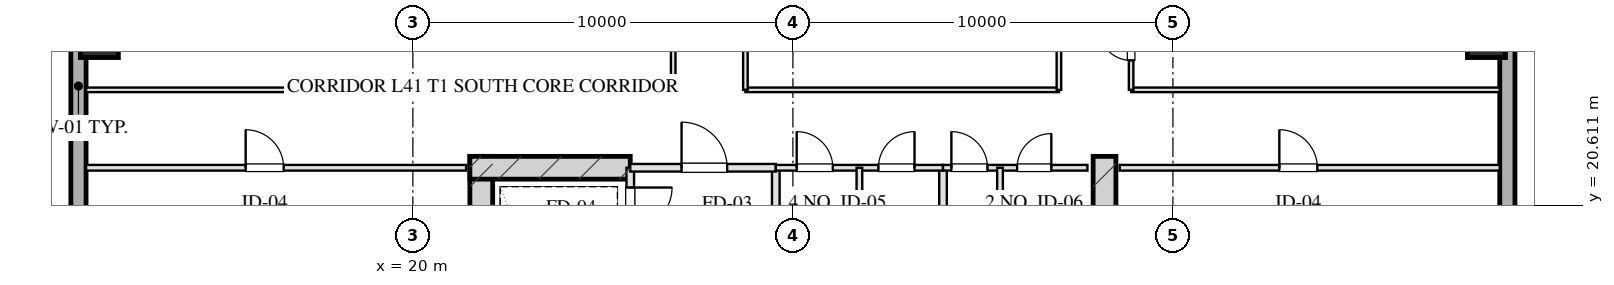
"""IFC4 building model, lengths in metres.
Left out: names, types, materials, properties, quantities, classifications, styles, units other than length and angle.
Written with IfcOpenShell. Run it as: python <this file> out.ifc"""

import sys

from ifc_helpers import new_model, si_unit, direction, frame, frame_2d, origin, origin_2d, place, context, subcontext, project, spatial, rectangle, hollow_rectangle, extrude, element, fill, save


model = new_model("IFC4")
c1 = context("Model", 3, precision=1e-05, world=origin(), true_north=direction((0.0, 1.0)))
c2 = subcontext(c1, "Body", "Model", "MODEL_VIEW")
j1 = project(units=[si_unit("LENGTHUNIT", "METRE"), si_unit("PLANEANGLEUNIT", "RADIAN")], contexts=[c1])
p1 = place(None, origin())
s1 = spatial("IfcSite", under=j1, at=p1, CompositionType="ELEMENT")
p2 = place(p1, origin())
s2 = spatial("IfcBuilding", under=s1, at=p2, CompositionType="ELEMENT")
p3 = place(p2, frame((0.0, 0.0, 156.4)))
s3 = spatial("IfcBuildingStorey", under=s2, at=p3, CompositionType="ELEMENT", Elevation=156.4)
for number, where, z_axis, x_axis in (
    (1, (21.8, 21.9, 0.0), (0.0, 0.0, 1.0), (0.0, -1.0, 0.0)),
    (2, (38.2, 21.9, 0.0), (0.0, 0.0, 1.0), (0.0, -1.0, 0.0)),
):
    element("IfcWall", number, at=place(p3, frame(where, z_axis=z_axis, x_axis=x_axis)), inside=s3, PredefinedType="SHEAR", context=c2, shape_type="SweptSolid", body=[
        extrude(rectangle(XDim=9.48, YDim=0.6, at=frame_2d((4.74, 0.0))), origin(), (0.0, 0.0, 1.0), 3.45),
    ])
p4 = place(p3, frame((21.5, 21.6, 0.0), z_axis=(0.0, 0.0, 1.0), x_axis=(1.0, 0.0, 0.0)))
e3 = element("IfcWall", 3, at=p4, inside=s3, PredefinedType="SHEAR", context=c2, shape_type="SweptSolid", body=[
    extrude(rectangle(XDim=4.22, YDim=0.6, at=frame_2d((2.11, 0.0))), origin(), (0.0, 0.0, 1.0), 3.45),
])
for number, where, z_axis, x_axis in (
    (4, (11.75, 25.0, 0.0), (0.0, 0.0, 1.0), (1.0, 0.0, 0.0)),
    (5, (48.25, 25.0, 0.0), (0.0, 0.0, 1.0), (1.0, 0.0, 0.0)),
):
    element("IfcColumn", number, at=place(p3, frame(where, z_axis=z_axis, x_axis=x_axis)), inside=s3, PredefinedType="COLUMN", context=c2, shape_type="SweptSolid", body=[
        extrude(hollow_rectangle(XDim=1.0, YDim=1.0, WallThickness=0.036, at=origin_2d()), origin(), (0.0, 0.0, 1.0), 3.451),
    ])
p5 = place(p3, frame((11.2, 9.0, 0.0), z_axis=(0.0, 0.0, 1.0), x_axis=(0.0, 1.0, 0.0)))
e6 = element("IfcWall", 6, at=p5, inside=s3, PredefinedType="SOLIDWALL", context=c2, shape_type="SweptSolid", body=[
    extrude(rectangle(XDim=50.0, YDim=0.4, at=frame_2d((25.0, 0.0))), origin(), (0.0, 0.0, 1.0), 2.61),
])
p6 = place(p5, frame((17.475, 0.0, 0.75)))
e7 = element("IfcOpeningElement", 7, at=p6, cuts=e6, PredefinedType="OPENING", context=c2, shape_type="SweptSolid", body=[
    extrude(rectangle(XDim=2.25, YDim=1.46, at=frame_2d((1.125, 0.73))), frame((0.0, 0.21, 0.0), z_axis=(0.0, -1.0, 0.0), x_axis=(1.0, 0.0, 0.0)), (0.0, 0.0, 1.0), 0.42),
])
p7 = place(p5, frame((30.25, 0.0, 0.0)))
e8 = element("IfcOpeningElement", 8, at=p7, cuts=e6, PredefinedType="OPENING", context=c2, shape_type="SweptSolid", body=[
    extrude(rectangle(XDim=1.1, YDim=2.15, at=frame_2d((0.55, 1.075))), frame((0.0, 0.21, 0.0), z_axis=(0.0, -1.0, 0.0), x_axis=(1.0, 0.0, 0.0)), (0.0, 0.0, 1.0), 0.42),
])
p8 = place(p3, frame((48.8, 59.0, 0.0), z_axis=(0.0, 0.0, 1.0), x_axis=(0.0, -1.0, 0.0)))
e9 = element("IfcWall", 9, at=p8, inside=s3, PredefinedType="SOLIDWALL", context=c2, shape_type="SweptSolid", body=[
    extrude(rectangle(XDim=50.0, YDim=0.4, at=frame_2d((25.0, 0.0))), origin(), (0.0, 0.0, 1.0), 2.61),
])
p9 = place(p8, frame((21.35, 0.0, 0.0)))
e10 = element("IfcOpeningElement", 10, at=p9, cuts=e9, PredefinedType="OPENING", context=c2, shape_type="SweptSolid", body=[
    extrude(rectangle(XDim=1.1, YDim=2.15, at=frame_2d((0.55, 1.075))), frame((0.0, 0.21, 0.0), z_axis=(0.0, -1.0, 0.0), x_axis=(1.0, 0.0, 0.0)), (0.0, 0.0, 1.0), 0.42),
])
p10 = place(p3, frame((25.72, 21.6, 0.0), z_axis=(0.0, 0.0, 1.0), x_axis=(0.0, -1.0, 0.0)))
e11 = element("IfcWall", 11, at=p10, inside=s3, PredefinedType="PARTITIONING", context=c2, shape_type="SweptSolid", body=[
    extrude(rectangle(XDim=1.9, YDim=0.2, at=frame_2d((0.95, 0.0))), origin(), (0.0, 0.0, 1.0), 3.175),
])
p11 = place(p10, frame((0.52, 0.0, 0.0)))
e12 = element("IfcOpeningElement", 12, at=p11, cuts=e11, PredefinedType="OPENING", context=c2, shape_type="SweptSolid", body=[
    extrude(rectangle(XDim=1.1, YDim=2.05, at=frame_2d((0.55, 1.025))), frame((0.0, 0.11, 0.0), z_axis=(0.0, -1.0, 0.0), x_axis=(1.0, 0.0, 0.0)), (0.0, 0.0, 1.0), 0.22),
])
p12 = place(p3, frame((29.55, 21.6, 0.0), z_axis=(0.0, 0.0, 1.0), x_axis=(0.0, -1.0, 0.0)))
e13 = element("IfcWall", 13, at=p12, inside=s3, PredefinedType="PARTITIONING", context=c2, shape_type="SweptSolid", body=[
    extrude(rectangle(XDim=8.43, YDim=0.2, at=frame_2d((4.215, 0.0))), origin(), (0.0, 0.0, 1.0), 3.175),
])
p13 = place(p3, frame((25.72, 21.6, 0.0), z_axis=(0.0, 0.0, 1.0), x_axis=(1.0, 0.0, 0.0)))
e14 = element("IfcWall", 14, at=p13, inside=s3, PredefinedType="PARTITIONING", context=c2, shape_type="SweptSolid", body=[
    extrude(rectangle(XDim=3.83, YDim=0.2, at=frame_2d((1.915, 0.0))), origin(), (0.0, 0.0, 1.0), 3.175),
])
p14 = place(p13, frame((1.35, 0.0, 0.0)))
e15 = element("IfcOpeningElement", 15, at=p14, cuts=e14, PredefinedType="OPENING", context=c2, shape_type="SweptSolid", body=[
    extrude(rectangle(XDim=1.2, YDim=2.05, at=frame_2d((0.6, 1.025))), frame((0.0, 0.11, 0.0), z_axis=(0.0, -1.0, 0.0), x_axis=(1.0, 0.0, 0.0)), (0.0, 0.0, 1.0), 0.22),
])
p15 = place(p3, frame((33.95, 21.6, 0.0), z_axis=(0.0, 0.0, 1.0), x_axis=(0.0, -1.0, 0.0)))
e16 = element("IfcWall", 16, at=p15, inside=s3, PredefinedType="PARTITIONING", context=c2, shape_type="SweptSolid", body=[
    extrude(rectangle(XDim=8.43, YDim=0.2, at=frame_2d((4.215, 0.0))), origin(), (0.0, 0.0, 1.0), 3.175),
])
p16 = place(p3, frame((29.55, 21.6, 0.0), z_axis=(0.0, 0.0, 1.0), x_axis=(1.0, 0.0, 0.0)))
e17 = element("IfcWall", 17, at=p16, inside=s3, PredefinedType="PARTITIONING", context=c2, shape_type="SweptSolid", body=[
    extrude(rectangle(XDim=4.4, YDim=0.15, at=frame_2d((2.2, 0.0))), origin(), (0.0, 0.0, 1.0), 3.175),
])
p17 = place(p16, frame((0.55, 0.0, 0.0)))
e18 = element("IfcOpeningElement", 18, at=p17, cuts=e17, PredefinedType="OPENING", context=c2, shape_type="SweptSolid", body=[
    extrude(rectangle(XDim=0.95, YDim=2.05, at=frame_2d((0.475, 1.025))), frame((0.0, 0.085, 0.0), z_axis=(0.0, -1.0, 0.0), x_axis=(1.0, 0.0, 0.0)), (0.0, 0.0, 1.0), 0.17),
])
p18 = place(p16, frame((2.7, 0.0, 0.0)))
e19 = element("IfcOpeningElement", 19, at=p18, cuts=e17, PredefinedType="OPENING", context=c2, shape_type="SweptSolid", body=[
    extrude(rectangle(XDim=0.95, YDim=2.05, at=frame_2d((0.475, 1.025))), frame((0.0, 0.085, 0.0), z_axis=(0.0, -1.0, 0.0), x_axis=(1.0, 0.0, 0.0)), (0.0, 0.0, 1.0), 0.17),
])
p19 = place(p3, frame((31.75, 21.6, 0.0), z_axis=(0.0, 0.0, 1.0), x_axis=(0.0, -1.0, 0.0)))
e20 = element("IfcWall", 20, at=p19, inside=s3, PredefinedType="PARTITIONING", context=c2, shape_type="SweptSolid", body=[
    extrude(rectangle(XDim=8.43, YDim=0.15, at=frame_2d((4.215, 0.0))), origin(), (0.0, 0.0, 1.0), 3.175),
])
p20 = place(p3, frame((33.95, 21.6, 0.0), z_axis=(0.0, 0.0, 1.0), x_axis=(1.0, 0.0, 0.0)))
e21 = element("IfcWall", 21, at=p20, inside=s3, PredefinedType="PARTITIONING", context=c2, shape_type="SweptSolid", body=[
    extrude(rectangle(XDim=3.8, YDim=0.15, at=frame_2d((1.9, 0.0))), origin(), (0.0, 0.0, 1.0), 3.175),
])
p21 = place(p20, frame((0.22, 0.0, 0.0)))
e22 = element("IfcOpeningElement", 22, at=p21, cuts=e21, PredefinedType="OPENING", context=c2, shape_type="SweptSolid", body=[
    extrude(rectangle(XDim=0.95, YDim=2.05, at=frame_2d((0.475, 1.025))), frame((0.0, 0.085, 0.0), z_axis=(0.0, -1.0, 0.0), x_axis=(1.0, 0.0, 0.0)), (0.0, 0.0, 1.0), 0.17),
])
p22 = place(p20, frame((1.95, 0.0, 0.0)))
e23 = element("IfcOpeningElement", 23, at=p22, cuts=e21, PredefinedType="OPENING", context=c2, shape_type="SweptSolid", body=[
    extrude(rectangle(XDim=0.9, YDim=2.05, at=frame_2d((0.45, 1.025))), frame((0.0, 0.085, 0.0), z_axis=(0.0, -1.0, 0.0), x_axis=(1.0, 0.0, 0.0)), (0.0, 0.0, 1.0), 0.17),
])
p23 = place(p3, frame((35.45, 21.6, 0.0), z_axis=(0.0, 0.0, 1.0), x_axis=(0.0, -1.0, 0.0)))
e24 = element("IfcWall", 24, at=p23, inside=s3, PredefinedType="PARTITIONING", context=c2, shape_type="SweptSolid", body=[
    extrude(rectangle(XDim=8.43, YDim=0.15, at=frame_2d((4.215, 0.0))), origin(), (0.0, 0.0, 1.0), 2.815),
])
p24 = place(p23, frame((2.55, 0.0, 0.0)))
e25 = element("IfcOpeningElement", 25, at=p24, cuts=e24, PredefinedType="OPENING", context=c2, shape_type="SweptSolid", body=[
    extrude(rectangle(XDim=0.95, YDim=2.05, at=frame_2d((0.475, 1.025))), frame((0.0, 0.085, 0.0), z_axis=(0.0, -1.0, 0.0), x_axis=(1.0, 0.0, 0.0)), (0.0, 0.0, 1.0), 0.17),
])
p25 = place(p23, frame((5.6, 0.0, 0.0)))
e26 = element("IfcOpeningElement", 26, at=p25, cuts=e24, PredefinedType="OPENING", context=c2, shape_type="SweptSolid", body=[
    extrude(rectangle(XDim=0.9, YDim=2.05, at=frame_2d((0.45, 1.025))), frame((0.0, 0.085, 0.0), z_axis=(0.0, -1.0, 0.0), x_axis=(1.0, 0.0, 0.0)), (0.0, 0.0, 1.0), 0.17),
])
p26 = place(p3, frame((11.4, 21.6, 0.0), z_axis=(0.0, 0.0, 1.0), x_axis=(1.0, 0.0, 0.0)))
e27 = element("IfcWall", 27, at=p26, inside=s3, PredefinedType="PARTITIONING", context=c2, shape_type="SweptSolid", body=[
    extrude(rectangle(XDim=10.0, YDim=0.15, at=frame_2d((5.0, 0.0))), origin(), (0.0, 0.0, 1.0), 2.15),
])
p27 = place(p26, frame((4.2, 0.0, 0.0)))
e28 = element("IfcOpeningElement", 28, at=p27, cuts=e27, PredefinedType="OPENING", context=c2, shape_type="SweptSolid", body=[
    extrude(rectangle(XDim=1.0, YDim=2.05, at=frame_2d((0.5, 1.025))), frame((0.0, 0.085, 0.0), z_axis=(0.0, -1.0, 0.0), x_axis=(1.0, 0.0, 0.0)), (0.0, 0.0, 1.0), 0.17),
])
p28 = place(p3, frame((38.6, 21.6, 0.0), z_axis=(0.0, 0.0, 1.0), x_axis=(1.0, 0.0, 0.0)))
e29 = element("IfcWall", 29, at=p28, inside=s3, PredefinedType="PARTITIONING", context=c2, shape_type="SweptSolid", body=[
    extrude(rectangle(XDim=10.0, YDim=0.15, at=frame_2d((5.0, 0.0))), origin(), (0.0, 0.0, 1.0), 2.15),
])
p29 = place(p28, frame((4.2, 0.0, 0.0)))
e30 = element("IfcOpeningElement", 30, at=p29, cuts=e29, PredefinedType="OPENING", context=c2, shape_type="SweptSolid", body=[
    extrude(rectangle(XDim=1.0, YDim=2.05, at=frame_2d((0.5, 1.025))), frame((0.0, 0.085, 0.0), z_axis=(0.0, -1.0, 0.0), x_axis=(1.0, 0.0, 0.0)), (0.0, 0.0, 1.0), 0.17),
])
p30 = place(p3, frame((11.4, 23.65, 0.0), z_axis=(0.0, 0.0, 1.0), x_axis=(1.0, 0.0, 0.0)))
e31 = element("IfcWall", 31, at=p30, inside=s3, PredefinedType="PARTITIONING", context=c2, shape_type="SweptSolid", body=[
    extrude(rectangle(XDim=15.45, YDim=0.12, at=frame_2d((7.725, 0.0))), origin(), (0.0, 0.0, 1.0), 2.15),
])
p31 = place(p3, frame((28.75, 23.65, 0.0), z_axis=(0.0, 0.0, 1.0), x_axis=(1.0, 0.0, 0.0)))
e32 = element("IfcWall", 32, at=p31, inside=s3, PredefinedType="PARTITIONING", context=c2, shape_type="SweptSolid", body=[
    extrude(rectangle(XDim=8.25, YDim=0.12, at=frame_2d((4.125, 0.0))), origin(), (0.0, 0.0, 1.0), 3.175),
])
p32 = place(p3, frame((38.9, 23.65, 0.0), z_axis=(0.0, 0.0, 1.0), x_axis=(1.0, 0.0, 0.0)))
e33 = element("IfcWall", 33, at=p32, inside=s3, PredefinedType="PARTITIONING", context=c2, shape_type="SweptSolid", body=[
    extrude(rectangle(XDim=9.7, YDim=0.12, at=frame_2d((4.85, 0.0))), origin(), (0.0, 0.0, 1.0), 2.15),
])
p33 = place(p3, frame((26.85, 23.65, 0.0), z_axis=(0.0, 0.0, 1.0), x_axis=(0.0, 1.0, 0.0)))
e34 = element("IfcWall", 34, at=p33, inside=s3, PredefinedType="PARTITIONING", context=c2, shape_type="SweptSolid", body=[
    extrude(rectangle(XDim=20.7, YDim=0.12, at=frame_2d((10.35, 0.0))), origin(), (0.0, 0.0, 1.0), 3.175),
])
p34 = place(p33, frame((2.675, 0.0, 0.0)))
e35 = element("IfcOpeningElement", 35, at=p34, cuts=e34, PredefinedType="OPENING", context=c2, shape_type="SweptSolid", body=[
    extrude(rectangle(XDim=1.0, YDim=2.05, at=frame_2d((0.5, 1.025))), frame((0.0, 0.07, 0.0), z_axis=(0.0, -1.0, 0.0), x_axis=(1.0, 0.0, 0.0)), (0.0, 0.0, 1.0), 0.14),
])
p35 = place(p33, frame((9.85, 0.0, 0.0)))
e36 = element("IfcOpeningElement", 36, at=p35, cuts=e34, PredefinedType="OPENING", context=c2, shape_type="SweptSolid", body=[
    extrude(rectangle(XDim=1.05, YDim=2.05, at=frame_2d((0.525, 1.025))), frame((0.0, 0.07, 0.0), z_axis=(0.0, -1.0, 0.0), x_axis=(1.0, 0.0, 0.0)), (0.0, 0.0, 1.0), 0.14),
])
p36 = place(p33, frame((17.025, 0.0, 0.0)))
e37 = element("IfcOpeningElement", 37, at=p36, cuts=e34, PredefinedType="OPENING", context=c2, shape_type="SweptSolid", body=[
    extrude(rectangle(XDim=1.0, YDim=2.05, at=frame_2d((0.5, 1.025))), frame((0.0, 0.07, 0.0), z_axis=(0.0, -1.0, 0.0), x_axis=(1.0, 0.0, 0.0)), (0.0, 0.0, 1.0), 0.14),
])
p37 = place(p3, frame((28.75, 23.65, 0.0), z_axis=(0.0, 0.0, 1.0), x_axis=(0.0, 1.0, 0.0)))
e38 = element("IfcWall", 38, at=p37, inside=s3, PredefinedType="PARTITIONING", context=c2, shape_type="SweptSolid", body=[
    extrude(rectangle(XDim=20.7, YDim=0.12, at=frame_2d((10.35, 0.0))), origin(), (0.0, 0.0, 1.0), 3.175),
])
p38 = place(p37, frame((9.936, 0.0, 0.0)))
e39 = element("IfcOpeningElement", 39, at=p38, cuts=e38, PredefinedType="OPENING", context=c2, shape_type="SweptSolid", body=[
    extrude(rectangle(XDim=1.1, YDim=2.05, at=frame_2d((0.55, 1.025))), frame((0.0, 0.07, 0.0), z_axis=(0.0, -1.0, 0.0), x_axis=(1.0, 0.0, 0.0)), (0.0, 0.0, 1.0), 0.14),
])
p39 = place(p3, frame((37.0, 23.65, 0.0), z_axis=(0.0, 0.0, 1.0), x_axis=(0.0, 1.0, 0.0)))
e40 = element("IfcWall", 40, at=p39, inside=s3, PredefinedType="PARTITIONING", context=c2, shape_type="SweptSolid", body=[
    extrude(rectangle(XDim=20.7, YDim=0.12, at=frame_2d((10.35, 0.0))), origin(), (0.0, 0.0, 1.0), 3.175),
])
p40 = place(p3, frame((38.9, 23.65, 0.0), z_axis=(0.0, 0.0, 1.0), x_axis=(0.0, 1.0, 0.0)))
e41 = element("IfcWall", 41, at=p40, inside=s3, PredefinedType="PARTITIONING", context=c2, shape_type="SweptSolid", body=[
    extrude(rectangle(XDim=20.7, YDim=0.12, at=frame_2d((10.35, 0.0))), origin(), (0.0, 0.0, 1.0), 3.175),
])
p41 = place(p40, frame((0.775, 0.0, 0.0)))
e42 = element("IfcOpeningElement", 42, at=p41, cuts=e41, PredefinedType="OPENING", context=c2, shape_type="SweptSolid", body=[
    extrude(rectangle(XDim=0.85, YDim=2.05, at=frame_2d((0.425, 1.025))), frame((0.0, 0.07, 0.0), z_axis=(0.0, -1.0, 0.0), x_axis=(1.0, 0.0, 0.0)), (0.0, 0.0, 1.0), 0.14),
])
p42 = place(p40, frame((3.95, 0.0, 0.0)))
e43 = element("IfcOpeningElement", 43, at=p42, cuts=e41, PredefinedType="OPENING", context=c2, shape_type="SweptSolid", body=[
    extrude(rectangle(XDim=1.0, YDim=2.05, at=frame_2d((0.5, 1.025))), frame((0.0, 0.07, 0.0), z_axis=(0.0, -1.0, 0.0), x_axis=(1.0, 0.0, 0.0)), (0.0, 0.0, 1.0), 0.14),
])
p43 = place(p40, frame((8.45, 0.0, 0.0)))
e44 = element("IfcOpeningElement", 44, at=p43, cuts=e41, PredefinedType="OPENING", context=c2, shape_type="SweptSolid", body=[
    extrude(rectangle(XDim=1.0, YDim=2.05, at=frame_2d((0.5, 1.025))), frame((0.0, 0.07, 0.0), z_axis=(0.0, -1.0, 0.0), x_axis=(1.0, 0.0, 0.0)), (0.0, 0.0, 1.0), 0.14),
])
p44 = place(p40, frame((12.95, 0.0, 0.0)))
e45 = element("IfcOpeningElement", 45, at=p44, cuts=e41, PredefinedType="OPENING", context=c2, shape_type="SweptSolid", body=[
    extrude(rectangle(XDim=1.0, YDim=2.05, at=frame_2d((0.5, 1.025))), frame((0.0, 0.07, 0.0), z_axis=(0.0, -1.0, 0.0), x_axis=(1.0, 0.0, 0.0)), (0.0, 0.0, 1.0), 0.14),
])
p45 = place(p40, frame((16.299, 0.0, 0.0)))
e46 = element("IfcOpeningElement", 46, at=p45, cuts=e41, PredefinedType="OPENING", context=c2, shape_type="SweptSolid", body=[
    extrude(rectangle(XDim=1.05, YDim=2.05, at=frame_2d((0.525, 1.025))), frame((0.0, 0.07, 0.0), z_axis=(0.0, -1.0, 0.0), x_axis=(1.0, 0.0, 0.0)), (0.0, 0.0, 1.0), 0.14),
])
p46 = place(p40, frame((18.974, 0.0, 0.0)))
e47 = element("IfcOpeningElement", 47, at=p46, cuts=e41, PredefinedType="OPENING", context=c2, shape_type="SweptSolid", body=[
    extrude(rectangle(XDim=1.0, YDim=2.05, at=frame_2d((0.5, 1.025))), frame((0.0, 0.07, 0.0), z_axis=(0.0, -1.0, 0.0), x_axis=(1.0, 0.0, 0.0)), (0.0, 0.0, 1.0), 0.14),
])
p47 = place(p11, origin())
e48 = element("IfcDoor", 48, at=p47, inside=s3, OperationType="SINGLE_SWING_LEFT", PredefinedType="DOOR", context=c2, shape_type="SweptSolid", body=[
    extrude(rectangle(XDim=1.1, YDim=2.05, at=frame_2d((0.55, 1.025))), frame((0.0, 0.025, 0.0), z_axis=(0.0, -1.0, 0.0), x_axis=(1.0, 0.0, 0.0)), (0.0, 0.0, 1.0), 0.05),
])
fill(e12, e48)
p48 = place(p14, origin())
e49 = element("IfcDoor", 49, at=p48, inside=s3, OperationType="SINGLE_SWING_LEFT", PredefinedType="DOOR", context=c2, shape_type="SweptSolid", body=[
    extrude(rectangle(XDim=1.2, YDim=2.05, at=frame_2d((0.6, 1.025))), frame((0.0, 0.025, 0.0), z_axis=(0.0, -1.0, 0.0), x_axis=(1.0, 0.0, 0.0)), (0.0, 0.0, 1.0), 0.05),
])
fill(e15, e49)
p49 = place(p17, origin())
e50 = element("IfcDoor", 50, at=p49, inside=s3, OperationType="SINGLE_SWING_LEFT", PredefinedType="DOOR", context=c2, shape_type="SweptSolid", body=[
    extrude(rectangle(XDim=0.95, YDim=2.05, at=frame_2d((0.475, 1.025))), frame((0.0, 0.025, 0.0), z_axis=(0.0, -1.0, 0.0), x_axis=(1.0, 0.0, 0.0)), (0.0, 0.0, 1.0), 0.05),
])
fill(e18, e50)
p50 = place(p18, origin())
e51 = element("IfcDoor", 51, at=p50, inside=s3, OperationType="SINGLE_SWING_RIGHT", PredefinedType="DOOR", context=c2, shape_type="SweptSolid", body=[
    extrude(rectangle(XDim=0.95, YDim=2.05, at=frame_2d((0.475, 1.025))), frame((0.0, 0.025, 0.0), z_axis=(0.0, -1.0, 0.0), x_axis=(1.0, 0.0, 0.0)), (0.0, 0.0, 1.0), 0.05),
])
fill(e19, e51)
p51 = place(p21, origin())
e52 = element("IfcDoor", 52, at=p51, inside=s3, OperationType="SINGLE_SWING_LEFT", PredefinedType="DOOR", context=c2, shape_type="SweptSolid", body=[
    extrude(rectangle(XDim=0.95, YDim=2.05, at=frame_2d((0.475, 1.025))), frame((0.0, 0.025, 0.0), z_axis=(0.0, -1.0, 0.0), x_axis=(1.0, 0.0, 0.0)), (0.0, 0.0, 1.0), 0.05),
])
fill(e22, e52)
p52 = place(p22, origin())
e53 = element("IfcDoor", 53, at=p52, inside=s3, OperationType="SINGLE_SWING_RIGHT", PredefinedType="DOOR", context=c2, shape_type="SweptSolid", body=[
    extrude(rectangle(XDim=0.9, YDim=2.05, at=frame_2d((0.45, 1.025))), frame((0.0, 0.025, 0.0), z_axis=(0.0, -1.0, 0.0), x_axis=(1.0, 0.0, 0.0)), (0.0, 0.0, 1.0), 0.05),
])
fill(e23, e53)
p53 = place(p27, origin())
e54 = element("IfcDoor", 54, at=p53, inside=s3, OperationType="SINGLE_SWING_LEFT", PredefinedType="DOOR", context=c2, shape_type="SweptSolid", body=[
    extrude(rectangle(XDim=1.0, YDim=2.05, at=frame_2d((0.5, 1.025))), frame((0.0, 0.025, 0.0), z_axis=(0.0, -1.0, 0.0), x_axis=(1.0, 0.0, 0.0)), (0.0, 0.0, 1.0), 0.05),
])
fill(e28, e54)
p54 = place(p29, origin())
e55 = element("IfcDoor", 55, at=p54, inside=s3, OperationType="SINGLE_SWING_LEFT", PredefinedType="DOOR", context=c2, shape_type="SweptSolid", body=[
    extrude(rectangle(XDim=1.0, YDim=2.05, at=frame_2d((0.5, 1.025))), frame((0.0, 0.025, 0.0), z_axis=(0.0, -1.0, 0.0), x_axis=(1.0, 0.0, 0.0)), (0.0, 0.0, 1.0), 0.05),
])
fill(e30, e55)
p55 = place(p41, origin())
e56 = element("IfcDoor", 56, at=p55, inside=s3, OperationType="SINGLE_SWING_RIGHT", PredefinedType="DOOR", context=c2, shape_type="SweptSolid", body=[
    extrude(rectangle(XDim=0.85, YDim=2.05, at=frame_2d((0.425, 1.025))), frame((0.0, 0.025, 0.0), z_axis=(0.0, -1.0, 0.0), x_axis=(1.0, 0.0, 0.0)), (0.0, 0.0, 1.0), 0.05),
])
fill(e42, e56)
save(model, sys.argv[1])
